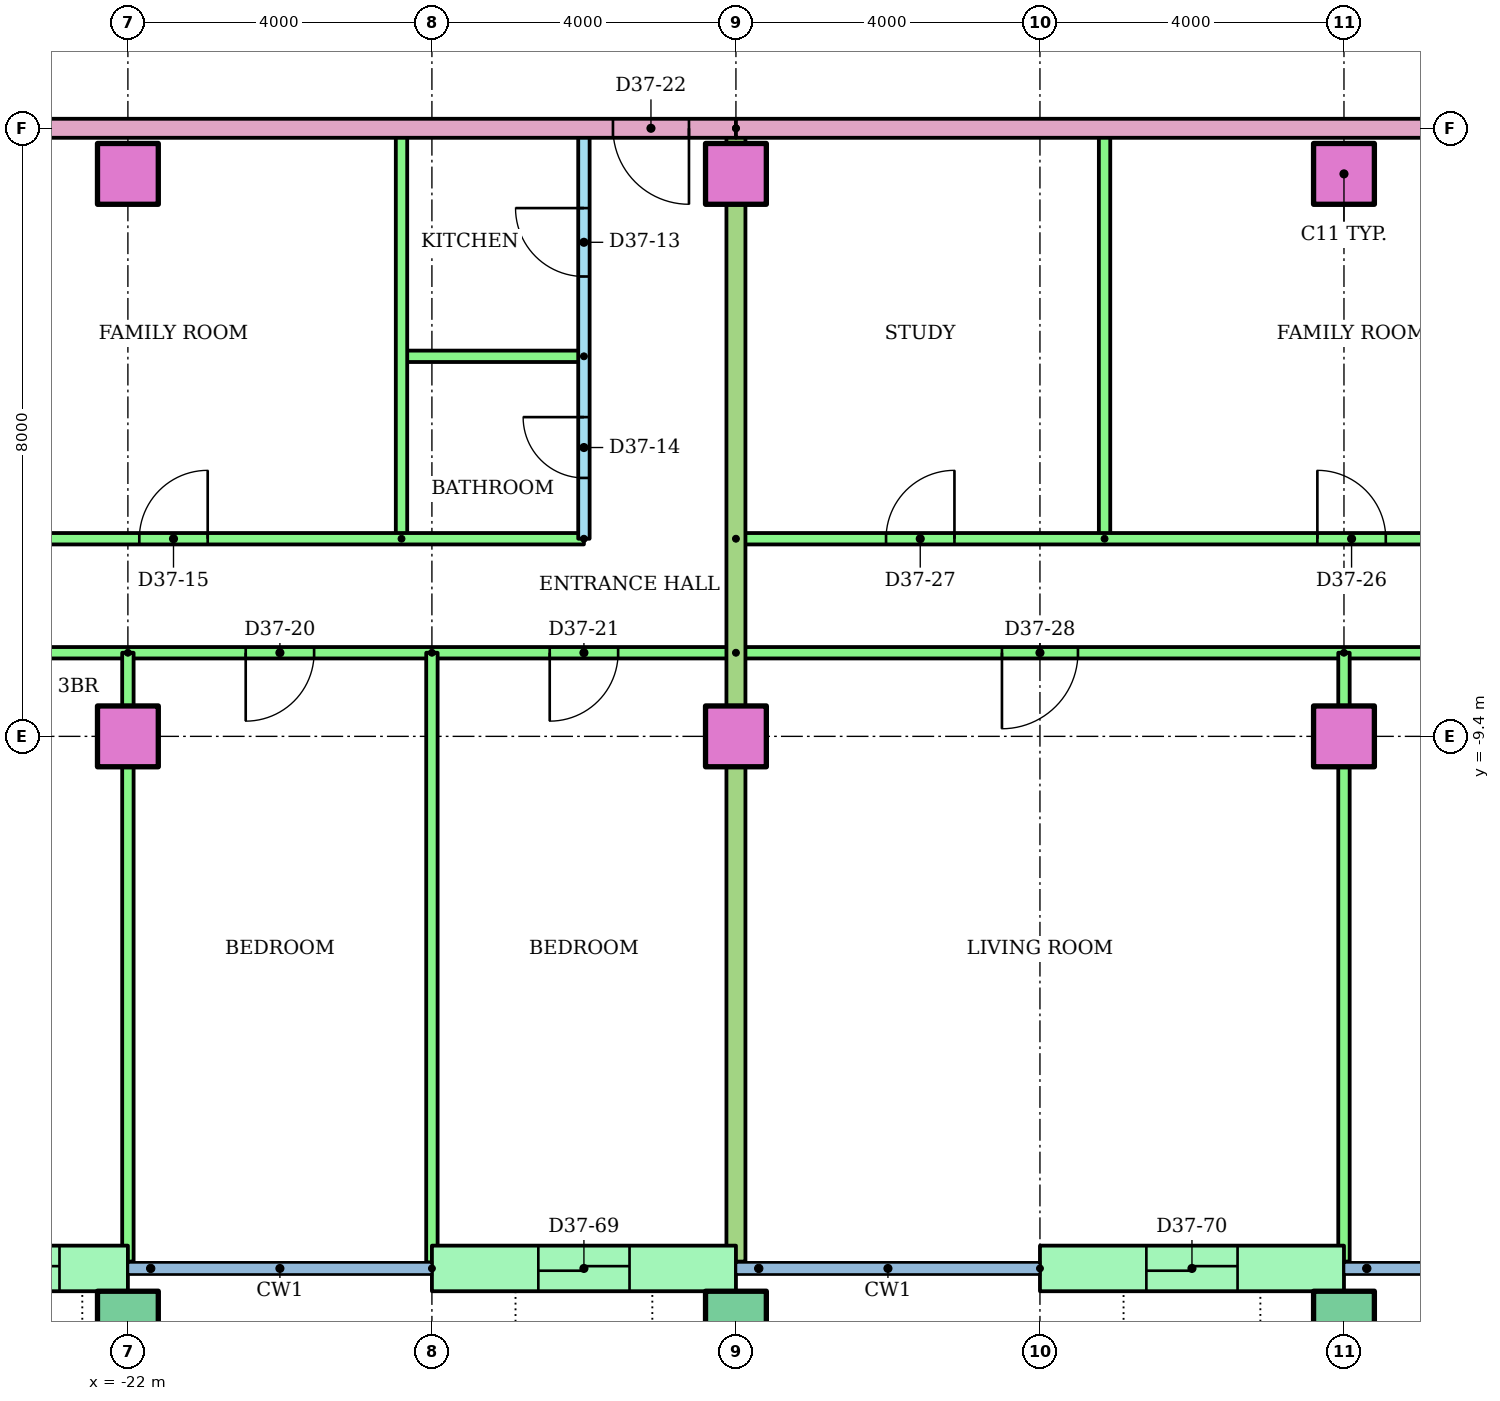
"""IFC4 building model, lengths in metres.
Left out: names, types, materials, properties, quantities, classifications, styles, units other than length and angle.
Written with IfcOpenShell. Run it as: python <this file> out.ifc"""

import sys

from ifc_helpers import new_model, si_unit, direction, frame, frame_2d, origin, origin_2d, place, context, subcontext, project, spatial, rectangle, hollow_rectangle, extrude, element, fill, save


model = new_model("IFC4")
c1 = context("Model", 3, precision=1e-05, world=origin(), true_north=direction((0.0, 1.0)))
c2 = subcontext(c1, "Body", "Model", "MODEL_VIEW")
j1 = project(units=[si_unit("LENGTHUNIT", "METRE"), si_unit("PLANEANGLEUNIT", "RADIAN")], contexts=[c1])
p1 = place(None, origin())
s1 = spatial("IfcSite", under=j1, at=p1, CompositionType="ELEMENT")
p2 = place(p1, origin())
s2 = spatial("IfcBuilding", under=s1, at=p2, CompositionType="ELEMENT")
p3 = place(p2, frame((0.0, 0.0, 142.2)))
s3 = spatial("IfcBuildingStorey", under=s2, at=p3, CompositionType="ELEMENT", Elevation=142.2)
for number, where in (
    (1, (-22.0, -17.1, 0.0)),
    (2, (-14.0, -17.1, 0.0)),
    (3, (-6.0, -17.1, 0.0)),
):
    element("IfcColumn", number, at=place(p3, frame(where)), inside=s3, PredefinedType="COLUMN", context=c2, shape_type="SweptSolid", body=[
        extrude(hollow_rectangle(XDim=0.8, YDim=0.8, WallThickness=0.04, at=origin_2d()), origin(), (0.0, 0.0, 1.0), 3.2),
    ])
for number, where in (
    (4, (-22.0, -9.4, 0.0)),
    (5, (-14.0, -9.4, 0.0)),
    (6, (-6.0, -9.4, 0.0)),
    (7, (-22.0, -2.0, 0.0)),
    (8, (-14.0, -2.0, 0.0)),
    (9, (-6.0, -2.0, 0.0)),
):
    element("IfcColumn", number, at=place(p3, frame(where)), inside=s3, PredefinedType="COLUMN", context=c2, shape_type="SweptSolid", body=[
        extrude(rectangle(XDim=0.8, YDim=0.8, at=origin_2d()), origin(), (0.0, 0.0, 1.0), 3.2),
    ])
p4 = place(p3, frame((-25.0, -16.4, 0.0)))
e10 = element("IfcWall", 10, at=p4, inside=s3, PredefinedType="STANDARD", context=c2, shape_type="SweptSolid", body=[
    extrude(rectangle(XDim=3.0, YDim=0.6, at=frame_2d((1.5, 0.0))), origin(), (0.0, 0.0, 1.0), 2.92),
])
p5 = place(p4, frame((0.9, 0.0, 0.0)))
e11 = element("IfcOpeningElement", 11, at=p5, cuts=e10, PredefinedType="OPENING", context=c2, shape_type="SweptSolid", body=[
    extrude(rectangle(XDim=1.2, YDim=2.1, at=frame_2d((0.6, 1.05))), frame((0.0, 0.31, 0.0), z_axis=(0.0, -1.0, 0.0), x_axis=(1.0, 0.0, 0.0)), (0.0, 0.0, 1.0), 0.62),
])
p6 = place(p3, frame((-18.0, -16.4, 0.0)))
e12 = element("IfcWall", 12, at=p6, inside=s3, PredefinedType="STANDARD", context=c2, shape_type="SweptSolid", body=[
    extrude(rectangle(XDim=4.0, YDim=0.6, at=frame_2d((2.0, 0.0))), origin(), (0.0, 0.0, 1.0), 2.92),
])
p7 = place(p6, frame((1.4, 0.0, 0.0)))
e13 = element("IfcOpeningElement", 13, at=p7, cuts=e12, PredefinedType="OPENING", context=c2, shape_type="SweptSolid", body=[
    extrude(rectangle(XDim=1.2, YDim=2.1, at=frame_2d((0.6, 1.05))), frame((0.0, 0.31, 0.0), z_axis=(0.0, -1.0, 0.0), x_axis=(1.0, 0.0, 0.0)), (0.0, 0.0, 1.0), 0.62),
])
p8 = place(p3, frame((-10.0, -16.4, 0.0)))
e14 = element("IfcWall", 14, at=p8, inside=s3, PredefinedType="STANDARD", context=c2, shape_type="SweptSolid", body=[
    extrude(rectangle(XDim=4.0, YDim=0.6, at=frame_2d((2.0, 0.0))), origin(), (0.0, 0.0, 1.0), 2.92),
])
p9 = place(p8, frame((1.4, 0.0, 0.0)))
e15 = element("IfcOpeningElement", 15, at=p9, cuts=e14, PredefinedType="OPENING", context=c2, shape_type="SweptSolid", body=[
    extrude(rectangle(XDim=1.2, YDim=2.1, at=frame_2d((0.6, 1.05))), frame((0.0, 0.31, 0.0), z_axis=(0.0, -1.0, 0.0), x_axis=(1.0, 0.0, 0.0)), (0.0, 0.0, 1.0), 0.62),
])
p10 = place(p3, frame((-16.0, -6.8, 0.0), z_axis=(0.0, 0.0, 1.0), x_axis=(0.0, 1.0, 0.0)))
e16 = element("IfcWall", 16, at=p10, inside=s3, PredefinedType="PARTITIONING", context=c2, shape_type="SweptSolid", body=[
    extrude(rectangle(XDim=5.4, YDim=0.15, at=frame_2d((2.7, 0.0))), origin(), (0.0, 0.0, 1.0), 2.4),
])
p11 = place(p10, frame((3.45, 0.0, 0.0)))
e17 = element("IfcOpeningElement", 17, at=p11, cuts=e16, PredefinedType="OPENING", context=c2, shape_type="SweptSolid", body=[
    extrude(rectangle(XDim=0.9, YDim=2.1, at=frame_2d((0.45, 1.05))), frame((0.0, 0.085, 0.0), z_axis=(0.0, -1.0, 0.0), x_axis=(1.0, 0.0, 0.0)), (0.0, 0.0, 1.0), 0.17),
])
p12 = place(p10, frame((0.8, 0.0, 0.0)))
e18 = element("IfcOpeningElement", 18, at=p12, cuts=e16, PredefinedType="OPENING", context=c2, shape_type="SweptSolid", body=[
    extrude(rectangle(XDim=0.8, YDim=2.1, at=frame_2d((0.4, 1.05))), frame((0.0, 0.085, 0.0), z_axis=(0.0, -1.0, 0.0), x_axis=(1.0, 0.0, 0.0)), (0.0, 0.0, 1.0), 0.17),
])
p13 = place(p3, frame((-16.0, -4.4, 0.0), z_axis=(0.0, 0.0, 1.0), x_axis=(-1.0, 0.0, 0.0)))
e19 = element("IfcWall", 19, at=p13, inside=s3, PredefinedType="PARTITIONING", context=c2, shape_type="SweptSolid", body=[
    extrude(rectangle(XDim=2.4, YDim=0.15, at=frame_2d((1.2, 0.0))), origin(), (0.0, 0.0, 1.0), 2.4),
])
p14 = place(p3, frame((-18.4, -6.8, 0.0), z_axis=(0.0, 0.0, 1.0), x_axis=(0.0, 1.0, 0.0)))
e20 = element("IfcWall", 20, at=p14, inside=s3, PredefinedType="PARTITIONING", context=c2, shape_type="SweptSolid", body=[
    extrude(rectangle(XDim=5.4, YDim=0.15, at=frame_2d((2.7, 0.0))), origin(), (0.0, 0.0, 1.0), 2.4),
])
p15 = place(p3, frame((-32.71, -6.8, 0.0)))
e21 = element("IfcWall", 21, at=p15, inside=s3, PredefinedType="PARTITIONING", context=c2, shape_type="SweptSolid", body=[
    extrude(rectangle(XDim=16.71, YDim=0.15, at=frame_2d((8.355, 0.0))), origin(), (0.0, 0.0, 1.0), 2.4),
])
p16 = place(p15, frame((10.86, 0.0, 0.0)))
e22 = element("IfcOpeningElement", 22, at=p16, cuts=e21, PredefinedType="OPENING", context=c2, shape_type="SweptSolid", body=[
    extrude(rectangle(XDim=0.9, YDim=2.1, at=frame_2d((0.45, 1.05))), frame((0.0, 0.085, 0.0), z_axis=(0.0, -1.0, 0.0), x_axis=(1.0, 0.0, 0.0)), (0.0, 0.0, 1.0), 0.17),
])
p17 = place(p15, frame((5.485, 0.0, 0.0)))
e23 = element("IfcOpeningElement", 23, at=p17, cuts=e21, PredefinedType="OPENING", context=c2, shape_type="SweptSolid", body=[
    extrude(rectangle(XDim=0.9, YDim=2.1, at=frame_2d((0.45, 1.05))), frame((0.0, 0.085, 0.0), z_axis=(0.0, -1.0, 0.0), x_axis=(1.0, 0.0, 0.0)), (0.0, 0.0, 1.0), 0.17),
])
p18 = place(p15, frame((1.435, 0.0, 0.0)))
e24 = element("IfcOpeningElement", 24, at=p18, cuts=e21, PredefinedType="OPENING", context=c2, shape_type="SweptSolid", body=[
    extrude(rectangle(XDim=0.9, YDim=2.1, at=frame_2d((0.45, 1.05))), frame((0.0, 0.085, 0.0), z_axis=(0.0, -1.0, 0.0), x_axis=(1.0, 0.0, 0.0)), (0.0, 0.0, 1.0), 0.17),
])
p19 = place(p3, frame((-14.0, -8.3, 0.0), z_axis=(0.0, 0.0, 1.0), x_axis=(-1.0, 0.0, 0.0)))
e25 = element("IfcWall", 25, at=p19, inside=s3, PredefinedType="PARTITIONING", context=c2, shape_type="SweptSolid", body=[
    extrude(rectangle(XDim=18.71, YDim=0.15, at=frame_2d((9.355, 0.0))), origin(), (0.0, 0.0, 1.0), 2.4),
])
p20 = place(p19, frame((16.618, 0.0, 0.0)))
e26 = element("IfcOpeningElement", 26, at=p20, cuts=e25, PredefinedType="OPENING", context=c2, shape_type="SweptSolid", body=[
    extrude(rectangle(XDim=0.9, YDim=2.1, at=frame_2d((0.45, 1.05))), frame((0.0, 0.085, 0.0), z_axis=(0.0, -1.0, 0.0), x_axis=(1.0, 0.0, 0.0)), (0.0, 0.0, 1.0), 0.17),
])
p21 = place(p19, frame((10.5, 0.0, 0.0)))
e27 = element("IfcOpeningElement", 27, at=p21, cuts=e25, PredefinedType="OPENING", context=c2, shape_type="SweptSolid", body=[
    extrude(rectangle(XDim=1.0, YDim=2.1, at=frame_2d((0.5, 1.05))), frame((0.0, 0.085, 0.0), z_axis=(0.0, -1.0, 0.0), x_axis=(1.0, 0.0, 0.0)), (0.0, 0.0, 1.0), 0.17),
])
p22 = place(p19, frame((5.55, 0.0, 0.0)))
e28 = element("IfcOpeningElement", 28, at=p22, cuts=e25, PredefinedType="OPENING", context=c2, shape_type="SweptSolid", body=[
    extrude(rectangle(XDim=0.9, YDim=2.1, at=frame_2d((0.45, 1.05))), frame((0.0, 0.085, 0.0), z_axis=(0.0, -1.0, 0.0), x_axis=(1.0, 0.0, 0.0)), (0.0, 0.0, 1.0), 0.17),
])
p23 = place(p19, frame((1.55, 0.0, 0.0)))
e29 = element("IfcOpeningElement", 29, at=p23, cuts=e25, PredefinedType="OPENING", context=c2, shape_type="SweptSolid", body=[
    extrude(rectangle(XDim=0.9, YDim=2.1, at=frame_2d((0.45, 1.05))), frame((0.0, 0.085, 0.0), z_axis=(0.0, -1.0, 0.0), x_axis=(1.0, 0.0, 0.0)), (0.0, 0.0, 1.0), 0.17),
])
p24 = place(p3, frame((-22.0, -8.3, 0.0), z_axis=(0.0, 0.0, 1.0), x_axis=(0.0, -1.0, 0.0)))
e30 = element("IfcWall", 30, at=p24, inside=s3, PredefinedType="PARTITIONING", context=c2, shape_type="SweptSolid", body=[
    extrude(rectangle(XDim=8.01, YDim=0.15, at=frame_2d((4.005, 0.0))), origin(), (0.0, 0.0, 1.0), 2.4),
])
p25 = place(p3, frame((-18.0, -8.3, 0.0), z_axis=(0.0, 0.0, 1.0), x_axis=(0.0, -1.0, 0.0)))
e31 = element("IfcWall", 31, at=p25, inside=s3, PredefinedType="PARTITIONING", context=c2, shape_type="SweptSolid", body=[
    extrude(rectangle(XDim=8.021, YDim=0.15, at=frame_2d((4.01, 0.0))), origin(), (0.0, 0.0, 1.0), 2.4),
])
p26 = place(p3, frame((-9.15, -6.8, 0.0), z_axis=(0.0, 0.0, 1.0), x_axis=(0.0, 1.0, 0.0)))
e32 = element("IfcWall", 32, at=p26, inside=s3, PredefinedType="PARTITIONING", context=c2, shape_type="SweptSolid", body=[
    extrude(rectangle(XDim=5.4, YDim=0.15, at=frame_2d((2.7, 0.0))), origin(), (0.0, 0.0, 1.0), 2.4),
])
p27 = place(p3, frame((-14.0, -6.8, 0.0)))
e33 = element("IfcWall", 33, at=p27, inside=s3, PredefinedType="PARTITIONING", context=c2, shape_type="SweptSolid", body=[
    extrude(rectangle(XDim=22.0, YDim=0.15, at=frame_2d((11.0, 0.0))), origin(), (0.0, 0.0, 1.0), 2.4),
])
p28 = place(p27, frame((15.025, 0.0, 0.0)))
e34 = element("IfcOpeningElement", 34, at=p28, cuts=e33, PredefinedType="OPENING", context=c2, shape_type="SweptSolid", body=[
    extrude(rectangle(XDim=0.9, YDim=2.1, at=frame_2d((0.45, 1.05))), frame((0.0, 0.085, 0.0), z_axis=(0.0, -1.0, 0.0), x_axis=(1.0, 0.0, 0.0)), (0.0, 0.0, 1.0), 0.17),
])
p29 = place(p27, frame((7.65, 0.0, 0.0)))
e35 = element("IfcOpeningElement", 35, at=p29, cuts=e33, PredefinedType="OPENING", context=c2, shape_type="SweptSolid", body=[
    extrude(rectangle(XDim=0.9, YDim=2.1, at=frame_2d((0.45, 1.05))), frame((0.0, 0.085, 0.0), z_axis=(0.0, -1.0, 0.0), x_axis=(1.0, 0.0, 0.0)), (0.0, 0.0, 1.0), 0.17),
])
p30 = place(p27, frame((1.975, 0.0, 0.0)))
e36 = element("IfcOpeningElement", 36, at=p30, cuts=e33, PredefinedType="OPENING", context=c2, shape_type="SweptSolid", body=[
    extrude(rectangle(XDim=0.9, YDim=2.1, at=frame_2d((0.45, 1.05))), frame((0.0, 0.085, 0.0), z_axis=(0.0, -1.0, 0.0), x_axis=(1.0, 0.0, 0.0)), (0.0, 0.0, 1.0), 0.17),
])
p31 = place(p3, frame((10.0, -8.3, 0.0), z_axis=(0.0, 0.0, 1.0), x_axis=(-1.0, 0.0, 0.0)))
e37 = element("IfcWall", 37, at=p31, inside=s3, PredefinedType="PARTITIONING", context=c2, shape_type="SweptSolid", body=[
    extrude(rectangle(XDim=24.0, YDim=0.15, at=frame_2d((12.0, 0.0))), origin(), (0.0, 0.0, 1.0), 2.4),
])
p32 = place(p31, frame((19.5, 0.0, 0.0)))
e38 = element("IfcOpeningElement", 38, at=p32, cuts=e37, PredefinedType="OPENING", context=c2, shape_type="SweptSolid", body=[
    extrude(rectangle(XDim=1.0, YDim=2.1, at=frame_2d((0.5, 1.05))), frame((0.0, 0.085, 0.0), z_axis=(0.0, -1.0, 0.0), x_axis=(1.0, 0.0, 0.0)), (0.0, 0.0, 1.0), 0.17),
])
p33 = place(p31, frame((13.55, 0.0, 0.0)))
e39 = element("IfcOpeningElement", 39, at=p33, cuts=e37, PredefinedType="OPENING", context=c2, shape_type="SweptSolid", body=[
    extrude(rectangle(XDim=0.9, YDim=2.1, at=frame_2d((0.45, 1.05))), frame((0.0, 0.085, 0.0), z_axis=(0.0, -1.0, 0.0), x_axis=(1.0, 0.0, 0.0)), (0.0, 0.0, 1.0), 0.17),
])
p34 = place(p31, frame((9.55, 0.0, 0.0)))
e40 = element("IfcOpeningElement", 40, at=p34, cuts=e37, PredefinedType="OPENING", context=c2, shape_type="SweptSolid", body=[
    extrude(rectangle(XDim=0.9, YDim=2.1, at=frame_2d((0.45, 1.05))), frame((0.0, 0.085, 0.0), z_axis=(0.0, -1.0, 0.0), x_axis=(1.0, 0.0, 0.0)), (0.0, 0.0, 1.0), 0.17),
])
p35 = place(p31, frame((5.55, 0.0, 0.0)))
e41 = element("IfcOpeningElement", 41, at=p35, cuts=e37, PredefinedType="OPENING", context=c2, shape_type="SweptSolid", body=[
    extrude(rectangle(XDim=0.9, YDim=2.1, at=frame_2d((0.45, 1.05))), frame((0.0, 0.085, 0.0), z_axis=(0.0, -1.0, 0.0), x_axis=(1.0, 0.0, 0.0)), (0.0, 0.0, 1.0), 0.17),
])
p36 = place(p31, frame((1.55, 0.0, 0.0)))
e42 = element("IfcOpeningElement", 42, at=p36, cuts=e37, PredefinedType="OPENING", context=c2, shape_type="SweptSolid", body=[
    extrude(rectangle(XDim=0.9, YDim=2.1, at=frame_2d((0.45, 1.05))), frame((0.0, 0.085, 0.0), z_axis=(0.0, -1.0, 0.0), x_axis=(1.0, 0.0, 0.0)), (0.0, 0.0, 1.0), 0.17),
])
p37 = place(p3, frame((-6.0, -8.3, 0.0), z_axis=(0.0, 0.0, 1.0), x_axis=(0.0, -1.0, 0.0)))
e43 = element("IfcWall", 43, at=p37, inside=s3, PredefinedType="PARTITIONING", context=c2, shape_type="SweptSolid", body=[
    extrude(rectangle(XDim=8.01, YDim=0.15, at=frame_2d((4.005, 0.0))), origin(), (0.0, 0.0, 1.0), 2.4),
])
p38 = place(p3, frame((-14.0, -1.4, 0.0), z_axis=(0.0, 0.0, 1.0), x_axis=(0.0, -1.0, 0.0)))
e44 = element("IfcWall", 44, at=p38, inside=s3, PredefinedType="PARTITIONING", context=c2, shape_type="SweptSolid", body=[
    extrude(rectangle(XDim=14.91, YDim=0.25, at=frame_2d((7.455, 0.0))), origin(), (0.0, 0.0, 1.0), 2.4),
])
p39 = place(p3, frame((-14.0, -1.4, 0.0), z_axis=(0.0, 0.0, 1.0), x_axis=(-1.0, 0.0, 0.0)))
e45 = element("IfcWall", 45, at=p39, inside=s3, PredefinedType="PARTITIONING", context=c2, shape_type="SweptSolid", body=[
    extrude(rectangle(XDim=15.0, YDim=0.25, at=frame_2d((7.5, 0.0))), origin(), (0.0, 0.0, 1.0), 2.4),
])
p40 = place(p39, frame((0.618, 0.0, 0.0)))
e46 = element("IfcOpeningElement", 46, at=p40, cuts=e45, PredefinedType="OPENING", context=c2, shape_type="SweptSolid", body=[
    extrude(rectangle(XDim=1.0, YDim=2.1, at=frame_2d((0.5, 1.05))), frame((0.0, 0.135, 0.0), z_axis=(0.0, -1.0, 0.0), x_axis=(1.0, 0.0, 0.0)), (0.0, 0.0, 1.0), 0.27),
])
p41 = place(p3, frame((14.0, -1.4, 0.0), z_axis=(0.0, 0.0, 1.0), x_axis=(-1.0, 0.0, 0.0)))
e47 = element("IfcWall", 47, at=p41, inside=s3, PredefinedType="PARTITIONING", context=c2, shape_type="SweptSolid", body=[
    extrude(rectangle(XDim=28.0, YDim=0.25, at=frame_2d((14.0, 0.0))), origin(), (0.0, 0.0, 1.0), 2.4),
])
p42 = place(p41, frame((4.618, 0.0, 0.0)))
e48 = element("IfcOpeningElement", 48, at=p42, cuts=e47, PredefinedType="OPENING", context=c2, shape_type="SweptSolid", body=[
    extrude(rectangle(XDim=1.0, YDim=2.1, at=frame_2d((0.5, 1.05))), frame((0.0, 0.135, 0.0), z_axis=(0.0, -1.0, 0.0), x_axis=(1.0, 0.0, 0.0)), (0.0, 0.0, 1.0), 0.27),
])
p43 = place(p41, frame((2.382, 0.0, 0.0)))
e49 = element("IfcOpeningElement", 49, at=p43, cuts=e47, PredefinedType="OPENING", context=c2, shape_type="SweptSolid", body=[
    extrude(rectangle(XDim=1.0, YDim=2.1, at=frame_2d((0.5, 1.05))), frame((0.0, 0.135, 0.0), z_axis=(0.0, -1.0, 0.0), x_axis=(1.0, 0.0, 0.0)), (0.0, 0.0, 1.0), 0.27),
])
p44 = place(p11, origin())
e50 = element("IfcDoor", 50, at=p44, inside=s3, OperationType="SINGLE_SWING_RIGHT", PredefinedType="DOOR", context=c2, shape_type="SweptSolid", body=[
    extrude(rectangle(XDim=0.9, YDim=2.1, at=frame_2d((0.45, 1.05))), frame((0.0, 0.025, 0.0), z_axis=(0.0, -1.0, 0.0), x_axis=(1.0, 0.0, 0.0)), (0.0, 0.0, 1.0), 0.05),
])
fill(e17, e50)
p45 = place(p12, origin())
e51 = element("IfcDoor", 51, at=p45, inside=s3, OperationType="SINGLE_SWING_RIGHT", PredefinedType="DOOR", context=c2, shape_type="SweptSolid", body=[
    extrude(rectangle(XDim=0.8, YDim=2.1, at=frame_2d((0.4, 1.05))), frame((0.0, 0.025, 0.0), z_axis=(0.0, -1.0, 0.0), x_axis=(1.0, 0.0, 0.0)), (0.0, 0.0, 1.0), 0.05),
])
fill(e18, e51)
p46 = place(p16, origin())
e52 = element("IfcDoor", 52, at=p46, inside=s3, OperationType="SINGLE_SWING_RIGHT", PredefinedType="DOOR", context=c2, shape_type="SweptSolid", body=[
    extrude(rectangle(XDim=0.9, YDim=2.1, at=frame_2d((0.45, 1.05))), frame((0.0, 0.025, 0.0), z_axis=(0.0, -1.0, 0.0), x_axis=(1.0, 0.0, 0.0)), (0.0, 0.0, 1.0), 0.05),
])
fill(e22, e52)
p47 = place(p22, origin())
e53 = element("IfcDoor", 53, at=p47, inside=s3, OperationType="SINGLE_SWING_RIGHT", PredefinedType="DOOR", context=c2, shape_type="SweptSolid", body=[
    extrude(rectangle(XDim=0.9, YDim=2.1, at=frame_2d((0.45, 1.05))), frame((0.0, 0.025, 0.0), z_axis=(0.0, -1.0, 0.0), x_axis=(1.0, 0.0, 0.0)), (0.0, 0.0, 1.0), 0.05),
])
fill(e28, e53)
p48 = place(p23, origin())
e54 = element("IfcDoor", 54, at=p48, inside=s3, OperationType="SINGLE_SWING_RIGHT", PredefinedType="DOOR", context=c2, shape_type="SweptSolid", body=[
    extrude(rectangle(XDim=0.9, YDim=2.1, at=frame_2d((0.45, 1.05))), frame((0.0, 0.025, 0.0), z_axis=(0.0, -1.0, 0.0), x_axis=(1.0, 0.0, 0.0)), (0.0, 0.0, 1.0), 0.05),
])
fill(e29, e54)
p49 = place(p40, origin())
e55 = element("IfcDoor", 55, at=p49, inside=s3, OperationType="SINGLE_SWING_LEFT", PredefinedType="DOOR", context=c2, shape_type="SweptSolid", body=[
    extrude(rectangle(XDim=1.0, YDim=2.1, at=frame_2d((0.5, 1.05))), frame((0.0, 0.025, 0.0), z_axis=(0.0, -1.0, 0.0), x_axis=(1.0, 0.0, 0.0)), (0.0, 0.0, 1.0), 0.05),
])
fill(e46, e55)
p50 = place(p29, origin())
e56 = element("IfcDoor", 56, at=p50, inside=s3, OperationType="SINGLE_SWING_LEFT", PredefinedType="DOOR", context=c2, shape_type="SweptSolid", body=[
    extrude(rectangle(XDim=0.9, YDim=2.1, at=frame_2d((0.45, 1.05))), frame((0.0, 0.025, 0.0), z_axis=(0.0, -1.0, 0.0), x_axis=(1.0, 0.0, 0.0)), (0.0, 0.0, 1.0), 0.05),
])
fill(e35, e56)
p51 = place(p30, origin())
e57 = element("IfcDoor", 57, at=p51, inside=s3, OperationType="SINGLE_SWING_RIGHT", PredefinedType="DOOR", context=c2, shape_type="SweptSolid", body=[
    extrude(rectangle(XDim=0.9, YDim=2.1, at=frame_2d((0.45, 1.05))), frame((0.0, 0.025, 0.0), z_axis=(0.0, -1.0, 0.0), x_axis=(1.0, 0.0, 0.0)), (0.0, 0.0, 1.0), 0.05),
])
fill(e36, e57)
p52 = place(p32, origin())
e58 = element("IfcDoor", 58, at=p52, inside=s3, OperationType="SINGLE_SWING_RIGHT", PredefinedType="DOOR", context=c2, shape_type="SweptSolid", body=[
    extrude(rectangle(XDim=1.0, YDim=2.1, at=frame_2d((0.5, 1.05))), frame((0.0, 0.025, 0.0), z_axis=(0.0, -1.0, 0.0), x_axis=(1.0, 0.0, 0.0)), (0.0, 0.0, 1.0), 0.05),
])
fill(e38, e58)
p53 = place(p5, origin())
e59 = element("IfcDoor", 59, at=p53, inside=s3, OperationType="SLIDING_TO_LEFT", PredefinedType="DOOR", context=c2, shape_type="SweptSolid", body=[
    extrude(rectangle(XDim=1.2, YDim=2.1, at=frame_2d((0.6, 1.05))), frame((0.0, 0.025, 0.0), z_axis=(0.0, -1.0, 0.0), x_axis=(1.0, 0.0, 0.0)), (0.0, 0.0, 1.0), 0.05),
])
fill(e11, e59)
p54 = place(p7, origin())
e60 = element("IfcDoor", 60, at=p54, inside=s3, OperationType="SLIDING_TO_LEFT", PredefinedType="DOOR", context=c2, shape_type="SweptSolid", body=[
    extrude(rectangle(XDim=1.2, YDim=2.1, at=frame_2d((0.6, 1.05))), frame((0.0, 0.025, 0.0), z_axis=(0.0, -1.0, 0.0), x_axis=(1.0, 0.0, 0.0)), (0.0, 0.0, 1.0), 0.05),
])
fill(e13, e60)
p55 = place(p9, origin())
e61 = element("IfcDoor", 61, at=p55, inside=s3, OperationType="SLIDING_TO_LEFT", PredefinedType="DOOR", context=c2, shape_type="SweptSolid", body=[
    extrude(rectangle(XDim=1.2, YDim=2.1, at=frame_2d((0.6, 1.05))), frame((0.0, 0.025, 0.0), z_axis=(0.0, -1.0, 0.0), x_axis=(1.0, 0.0, 0.0)), (0.0, 0.0, 1.0), 0.05),
])
fill(e15, e61)
save(model, sys.argv[1])
